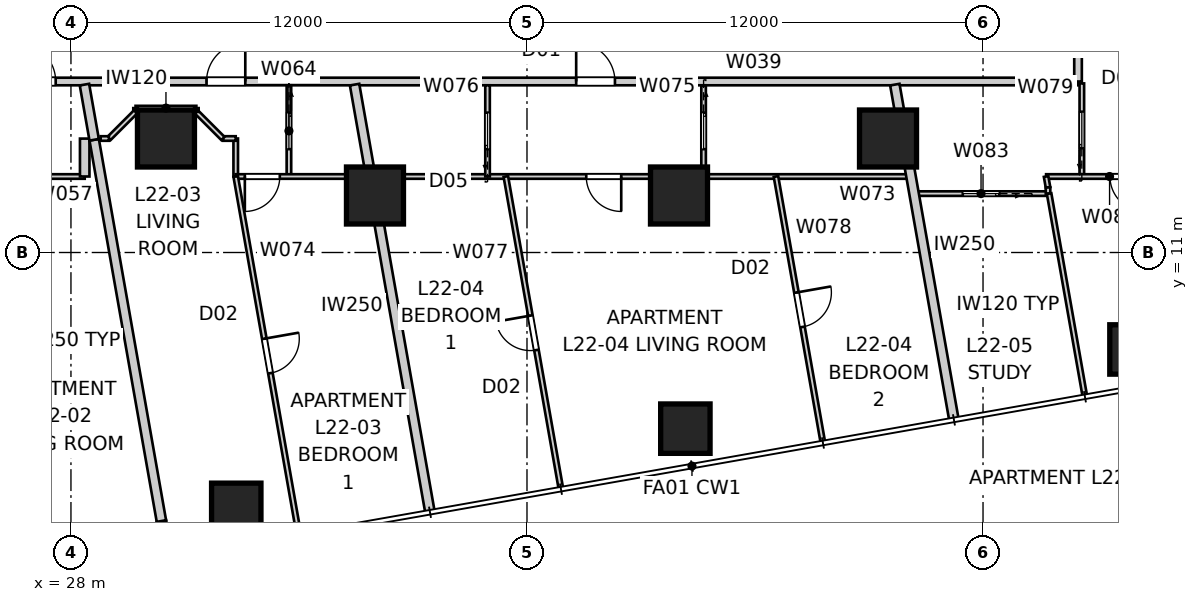
"""IFC4 building model, lengths in metres.
Left out: names, types, materials, properties, quantities, classifications, styles, units other than length and angle.
Written with IfcOpenShell. Run it as: python <this file> out.ifc"""

import sys

from ifc_helpers import new_model, si_unit, direction, frame, frame_2d, origin, origin_2d, place, context, subcontext, project, spatial, rectangle, extrude, element, fill, save


model = new_model("IFC4")
c1 = context("Model", 3, precision=1e-05, world=origin(), true_north=direction((0.0, 1.0)))
c2 = subcontext(c1, "Body", "Model", "MODEL_VIEW")
j1 = project(units=[si_unit("LENGTHUNIT", "METRE"), si_unit("PLANEANGLEUNIT", "RADIAN")], contexts=[c1])
p1 = place(None, origin())
s1 = spatial("IfcSite", under=j1, at=p1, CompositionType="ELEMENT")
p2 = place(p1, origin())
s2 = spatial("IfcBuilding", under=s1, at=p2, CompositionType="ELEMENT")
p3 = place(p2, frame((0.0, 0.0, 82.8)))
s3 = spatial("IfcBuildingStorey", under=s2, at=p3, CompositionType="ELEMENT", Elevation=82.8)
for number, where, z_axis, x_axis in (
    (1, (32.35, 4.281, 0.0), (0.0, 0.0, 1.0), (1.0, 0.0, 0.0)),
    (2, (44.167, 6.365, 0.0), (0.0, 0.0, 1.0), (1.0, 0.0, 0.0)),
    (3, (55.985, 8.448, 0.0), (0.0, 0.0, 1.0), (1.0, 0.0, 0.0)),
):
    element("IfcColumn", number, at=place(p3, frame(where, z_axis=z_axis, x_axis=x_axis)), inside=s3, PredefinedType="COLUMN", context=c2, shape_type="SweptSolid", body=[
        extrude(rectangle(XDim=1.3, YDim=1.3, at=origin_2d()), origin(), (0.0, 0.0, 1.0), 3.4),
    ])
for number, where, z_axis, x_axis in (
    (4, (30.5, 14.0, 0.0), (0.0, 0.0, 1.0), (1.0, 0.0, 0.0)),
    (5, (36.0, 12.5, 0.0), (0.0, 0.0, 1.0), (1.0, 0.0, 0.0)),
    (6, (44.0, 12.5, 0.0), (0.0, 0.0, 1.0), (1.0, 0.0, 0.0)),
    (7, (49.5, 14.0, 0.0), (0.0, 0.0, 1.0), (1.0, 0.0, 0.0)),
):
    element("IfcColumn", number, at=place(p3, frame(where, z_axis=z_axis, x_axis=x_axis)), inside=s3, PredefinedType="COLUMN", context=c2, shape_type="SweptSolid", body=[
        extrude(rectangle(XDim=1.5, YDim=1.5, at=origin_2d()), origin(), (0.0, 0.0, 1.0), 3.4),
    ])
p4 = place(p3, frame((25.5, 15.5, 0.0), z_axis=(0.0, 0.0, 1.0), x_axis=(1.0, 0.0, 0.0)))
e8 = element("IfcWall", 8, at=p4, inside=s3, PredefinedType="PARTITIONING", context=c2, shape_type="SweptSolid", body=[
    extrude(rectangle(XDim=29.0, YDim=0.2, at=frame_2d((14.5, 0.0))), origin(), (0.0, 0.0, 1.0), 3.25),
])
p5 = place(p4, frame((15.794, 0.0, 0.0)))
e9 = element("IfcOpeningElement", 9, at=p5, cuts=e8, PredefinedType="OPENING", context=c2, shape_type="SweptSolid", body=[
    extrude(rectangle(XDim=1.02, YDim=2.34, at=frame_2d((0.51, 1.17))), frame((0.0, 0.11, 0.0), z_axis=(0.0, -1.0, 0.0), x_axis=(1.0, 0.0, 0.0)), (0.0, 0.0, 1.0), 0.22),
])
p6 = place(p4, frame((6.067, 0.0, 0.0)))
e10 = element("IfcOpeningElement", 10, at=p6, cuts=e8, PredefinedType="OPENING", context=c2, shape_type="SweptSolid", body=[
    extrude(rectangle(XDim=1.02, YDim=2.34, at=frame_2d((0.51, 1.17))), frame((0.0, 0.11, 0.0), z_axis=(0.0, -1.0, 0.0), x_axis=(1.0, 0.0, 0.0)), (0.0, 0.0, 1.0), 0.22),
])
p7 = place(p4, frame((1.079, 0.0, 0.0)))
e11 = element("IfcOpeningElement", 11, at=p7, cuts=e8, PredefinedType="OPENING", context=c2, shape_type="SweptSolid", body=[
    extrude(rectangle(XDim=1.02, YDim=2.34, at=frame_2d((0.51, 1.17))), frame((0.0, 0.11, 0.0), z_axis=(0.0, -1.0, 0.0), x_axis=(1.0, 0.0, 0.0)), (0.0, 0.0, 1.0), 0.22),
])
p8 = place(p3, frame((54.5, 15.5, 0.0), z_axis=(0.0, 0.0, 1.0), x_axis=(0.0, 1.0, 0.0)))
e12 = element("IfcWall", 12, at=p8, inside=s3, PredefinedType="PARTITIONING", context=c2, shape_type="SweptSolid", body=[
    extrude(rectangle(XDim=29.0, YDim=0.2, at=frame_2d((14.5, 0.0))), origin(), (0.0, 0.0, 1.0), 3.25),
])
p9 = place(p8, frame((21.815, 0.0, 0.0)))
e13 = element("IfcOpeningElement", 13, at=p9, cuts=e12, PredefinedType="OPENING", context=c2, shape_type="SweptSolid", body=[
    extrude(rectangle(XDim=1.02, YDim=2.34, at=frame_2d((0.51, 1.17))), frame((0.0, 0.11, 0.0), z_axis=(0.0, -1.0, 0.0), x_axis=(1.0, 0.0, 0.0)), (0.0, 0.0, 1.0), 0.22),
])
p10 = place(p8, frame((2.855, 0.0, 0.0)))
e14 = element("IfcOpeningElement", 14, at=p10, cuts=e12, PredefinedType="OPENING", context=c2, shape_type="SweptSolid", body=[
    extrude(rectangle(XDim=1.02, YDim=2.1, at=frame_2d((0.51, 1.05))), frame((0.0, 0.11, 0.0), z_axis=(0.0, -1.0, 0.0), x_axis=(1.0, 0.0, 0.0)), (0.0, 0.0, 1.0), 0.22),
])
p11 = place(p3, frame((37.448, 4.164, 0.0), z_axis=(0.0, 0.0, 1.0), x_axis=(-0.173635416642, 0.98481000304, 0.0)))
e15 = element("IfcWall", 15, at=p11, inside=s3, PredefinedType="PARTITIONING", context=c2, shape_type="SweptSolid", body=[
    extrude(rectangle(XDim=11.427, YDim=0.25, at=frame_2d((5.713, 0.0))), origin(), (0.0, 0.0, 1.0), 3.25),
])
p12 = place(p3, frame((51.235, 6.595, 0.0), z_axis=(0.0, 0.0, 1.0), x_axis=(-0.173654738504, 0.984806596137, 0.0)))
e16 = element("IfcWall", 16, at=p12, inside=s3, PredefinedType="PARTITIONING", context=c2, shape_type="SweptSolid", body=[
    extrude(rectangle(XDim=8.958, YDim=0.25, at=frame_2d((4.479, 0.0))), origin(), (0.0, 0.0, 1.0), 3.25),
])
p13 = place(p3, frame((30.554, 2.949, 0.0), z_axis=(0.0, 0.0, 1.0), x_axis=(-0.173813186416, 0.984778643263, 0.0)))
e17 = element("IfcWall", 17, at=p13, inside=s3, PredefinedType="PARTITIONING", context=c2, shape_type="SweptSolid", body=[
    extrude(rectangle(XDim=1.0, YDim=0.25, at=frame_2d((0.5, 0.0))), origin(), (0.0, 0.0, 1.0), 3.25),
])
p14 = place(p3, frame((30.38, 3.934, 0.0), z_axis=(0.0, 0.0, 1.0), x_axis=(-0.173644522411, 0.984808397525, 0.0)))
e18 = element("IfcWall", 18, at=p14, inside=s3, PredefinedType="PARTITIONING", context=c2, shape_type="SweptSolid", body=[
    extrude(rectangle(XDim=10.188, YDim=0.25, at=frame_2d((5.094, 0.0))), origin(), (0.0, 0.0, 1.0), 2.638),
])
p15 = place(p3, frame((28.611, 13.967, 0.0), z_axis=(0.0, 0.0, 1.0), x_axis=(-0.173634105885, 0.984810234143, 0.0)))
e19 = element("IfcWall", 19, at=p15, inside=s3, PredefinedType="PARTITIONING", context=c2, shape_type="SweptSolid", body=[
    extrude(rectangle(XDim=1.474, YDim=0.25, at=frame_2d((0.737, 0.0))), origin(), (0.0, 0.0, 1.0), 3.25),
])
p16 = place(p3, frame((28.362, 13.0, 0.0), z_axis=(0.0, 0.0, 1.0), x_axis=(-1.0, 0.0, 0.0)))
e20 = element("IfcWall", 20, at=p16, inside=s3, PredefinedType="PARTITIONING", context=c2, shape_type="SweptSolid", body=[
    extrude(rectangle(XDim=4.151, YDim=0.12, at=frame_2d((2.076, 0.0))), origin(), (0.0, 0.0, 1.0), 2.638),
])
p17 = place(p16, frame((1.76, 0.0, 0.0)))
e21 = element("IfcOpeningElement", 21, at=p17, cuts=e20, PredefinedType="OPENING", context=c2, shape_type="SweptSolid", body=[
    extrude(rectangle(XDim=0.92, YDim=2.34, at=frame_2d((0.46, 1.17))), frame((0.0, 0.07, 0.0), z_axis=(0.0, -1.0, 0.0), x_axis=(1.0, 0.0, 0.0)), (0.0, 0.0, 1.0), 0.14),
])
p18 = place(p3, frame((28.362, 13.998, 0.0), z_axis=(0.0, 0.0, 1.0), x_axis=(0.0, -1.0, 0.0)))
e22 = element("IfcWall", 22, at=p18, inside=s3, PredefinedType="PARTITIONING", context=c2, shape_type="SweptSolid", body=[
    extrude(rectangle(XDim=0.998, YDim=0.25, at=frame_2d((0.499, 0.0))), origin(), (0.0, 0.0, 1.0), 3.25),
])
p19 = place(p3, frame((33.736, 15.4, 0.0), z_axis=(0.0, 0.0, 1.0), x_axis=(0.0, -1.0, 0.0)))
e23 = element("IfcWall", 23, at=p19, inside=s3, PredefinedType="PARTITIONING", context=c2, shape_type="SweptSolid", body=[
    extrude(rectangle(XDim=2.4, YDim=0.12, at=frame_2d((1.2, 0.0))), origin(), (0.0, 0.0, 1.0), 3.25),
])
p20 = place(p19, frame((0.72, 0.0, 0.0)))
e24 = element("IfcOpeningElement", 24, at=p20, cuts=e23, PredefinedType="OPENING", context=c2, shape_type="SweptSolid", body=[
    extrude(rectangle(XDim=0.96, YDim=2.1, at=frame_2d((0.48, 1.05))), frame((0.0, 0.07, 0.0), z_axis=(0.0, -1.0, 0.0), x_axis=(1.0, 0.0, 0.0)), (0.0, 0.0, 1.0), 0.14),
])
p21 = place(p3, frame((32.336, 13.0, 0.0), z_axis=(0.0, 0.0, 1.0), x_axis=(0.0, 1.0, 0.0)))
e25 = element("IfcWall", 25, at=p21, inside=s3, PredefinedType="PARTITIONING", context=c2, shape_type="SweptSolid", body=[
    extrude(rectangle(XDim=1.0, YDim=0.12, at=frame_2d((0.5, 0.0))), origin(), (0.0, 0.0, 1.0), 3.25),
])
p22 = place(p3, frame((32.336, 14.0, 0.0), z_axis=(0.0, 0.0, 1.0), x_axis=(-1.0, 0.0, 0.0)))
e26 = element("IfcWall", 26, at=p22, inside=s3, PredefinedType="PARTITIONING", context=c2, shape_type="SweptSolid", body=[
    extrude(rectangle(XDim=0.336, YDim=0.12, at=frame_2d((0.168, 0.0))), origin(), (0.0, 0.0, 1.0), 3.25),
])
p23 = place(p3, frame((32.0, 14.0, 0.0), z_axis=(0.0, 0.0, 1.0), x_axis=(-0.707106781187, 0.707106781187, 0.0)))
e27 = element("IfcWall", 27, at=p23, inside=s3, PredefinedType="PARTITIONING", context=c2, shape_type="SweptSolid", body=[
    extrude(rectangle(XDim=0.99, YDim=0.12, at=frame_2d((0.495, 0.0))), origin(), (0.0, 0.0, 1.0), 3.25),
])
p24 = place(p3, frame((31.3, 14.8, 0.0), z_axis=(0.0, 0.0, 1.0), x_axis=(-1.0, 0.0, 0.0)))
e28 = element("IfcWall", 28, at=p24, inside=s3, PredefinedType="PARTITIONING", context=c2, shape_type="SweptSolid", body=[
    extrude(rectangle(XDim=1.6, YDim=0.12, at=frame_2d((0.8, 0.0))), origin(), (0.0, 0.0, 1.0), 3.25),
])
p25 = place(p3, frame((29.7, 14.7, 0.0), z_axis=(0.0, 0.0, 1.0), x_axis=(-0.707106781187, -0.707106781187, 0.0)))
e29 = element("IfcWall", 29, at=p25, inside=s3, PredefinedType="PARTITIONING", context=c2, shape_type="SweptSolid", body=[
    extrude(rectangle(XDim=0.99, YDim=0.12, at=frame_2d((0.495, 0.0))), origin(), (0.0, 0.0, 1.0), 3.25),
])
p26 = place(p3, frame((29.0, 14.0, 0.0), z_axis=(0.0, 0.0, 1.0), x_axis=(-1.0, 0.0, 0.0)))
e30 = element("IfcWall", 30, at=p26, inside=s3, PredefinedType="PARTITIONING", context=c2, shape_type="SweptSolid", body=[
    extrude(rectangle(XDim=0.219, YDim=0.12, at=frame_2d((0.109, 0.0))), origin(), (0.0, 0.0, 1.0), 3.25),
])
p27 = place(p3, frame((50.105, 13.0, 0.0), z_axis=(0.0, 0.0, 1.0), x_axis=(-1.0, 0.0, 0.0)))
e31 = element("IfcWall", 31, at=p27, inside=s3, PredefinedType="PARTITIONING", context=c2, shape_type="SweptSolid", body=[
    extrude(rectangle(XDim=17.77, YDim=0.12, at=frame_2d((8.885, 0.0))), origin(), (0.0, 0.0, 1.0), 2.55),
])
p28 = place(p27, frame((7.626, 0.0, 0.0)))
e32 = element("IfcOpeningElement", 32, at=p28, cuts=e31, PredefinedType="OPENING", context=c2, shape_type="SweptSolid", body=[
    extrude(rectangle(XDim=0.92, YDim=2.34, at=frame_2d((0.46, 1.17))), frame((0.0, 0.07, 0.0), z_axis=(0.0, -1.0, 0.0), x_axis=(1.0, 0.0, 0.0)), (0.0, 0.0, 1.0), 0.14),
])
p29 = place(p27, frame((16.61, 0.0, 0.0)))
e33 = element("IfcOpeningElement", 33, at=p29, cuts=e31, PredefinedType="OPENING", context=c2, shape_type="SweptSolid", body=[
    extrude(rectangle(XDim=0.92, YDim=2.34, at=frame_2d((0.46, 1.17))), frame((0.0, 0.07, 0.0), z_axis=(0.0, -1.0, 0.0), x_axis=(1.0, 0.0, 0.0)), (0.0, 0.0, 1.0), 0.14),
])
p30 = place(p3, frame((32.336, 13.0, 0.0), z_axis=(0.0, 0.0, 1.0), x_axis=(0.173624894944, -0.984811858101, 0.0)))
e34 = element("IfcWall", 34, at=p30, inside=s3, PredefinedType="PARTITIONING", context=c2, shape_type="SweptSolid", body=[
    extrude(rectangle(XDim=9.549, YDim=0.12, at=frame_2d((4.774, 0.0))), origin(), (0.0, 0.0, 1.0), 3.25),
])
p31 = place(p30, frame((4.334, 0.0, 0.0)))
e35 = element("IfcOpeningElement", 35, at=p31, cuts=e34, PredefinedType="OPENING", context=c2, shape_type="SweptSolid", body=[
    extrude(rectangle(XDim=0.92, YDim=2.34, at=frame_2d((0.46, 1.17))), frame((0.0, 0.07, 0.0), z_axis=(0.0, -1.0, 0.0), x_axis=(1.0, 0.0, 0.0)), (0.0, 0.0, 1.0), 0.14),
])
p32 = place(p3, frame((44.647, 15.4, 0.0), z_axis=(0.0, 0.0, 1.0), x_axis=(0.0, -1.0, 0.0)))
e36 = element("IfcWall", 36, at=p32, inside=s3, PredefinedType="PARTITIONING", context=c2, shape_type="SweptSolid", body=[
    extrude(rectangle(XDim=2.4, YDim=0.12, at=frame_2d((1.2, 0.0))), origin(), (0.0, 0.0, 1.0), 3.25),
])
p33 = place(p32, frame((0.72, 0.0, 0.0)))
e37 = element("IfcOpeningElement", 37, at=p33, cuts=e36, PredefinedType="OPENING", context=c2, shape_type="SweptSolid", body=[
    extrude(rectangle(XDim=0.96, YDim=2.1, at=frame_2d((0.48, 1.05))), frame((0.0, 0.07, 0.0), z_axis=(0.0, -1.0, 0.0), x_axis=(1.0, 0.0, 0.0)), (0.0, 0.0, 1.0), 0.14),
])
p34 = place(p3, frame((38.962, 13.0, 0.0), z_axis=(0.0, 0.0, 1.0), x_axis=(0.0, 1.0, 0.0)))
e38 = element("IfcWall", 38, at=p34, inside=s3, PredefinedType="PARTITIONING", context=c2, shape_type="SweptSolid", body=[
    extrude(rectangle(XDim=2.4, YDim=0.12, at=frame_2d((1.2, 0.0))), origin(), (0.0, 0.0, 1.0), 3.25),
])
p35 = place(p34, frame((0.72, 0.0, 0.0)))
e39 = element("IfcOpeningElement", 39, at=p35, cuts=e38, PredefinedType="OPENING", context=c2, shape_type="SweptSolid", body=[
    extrude(rectangle(XDim=0.96, YDim=2.1, at=frame_2d((0.48, 1.05))), frame((0.0, 0.07, 0.0), z_axis=(0.0, -1.0, 0.0), x_axis=(1.0, 0.0, 0.0)), (0.0, 0.0, 1.0), 0.14),
])
p36 = place(p3, frame((40.887, 4.812, 0.0), z_axis=(0.0, 0.0, 1.0), x_axis=(-0.173647980238, 0.984807787824, 0.0)))
e40 = element("IfcWall", 40, at=p36, inside=s3, PredefinedType="PARTITIONING", context=c2, shape_type="SweptSolid", body=[
    extrude(rectangle(XDim=8.315, YDim=0.12, at=frame_2d((4.157, 0.0))), origin(), (0.0, 0.0, 1.0), 3.25),
])
p37 = place(p36, frame((3.677, 0.0, 0.0)))
e41 = element("IfcOpeningElement", 41, at=p37, cuts=e40, PredefinedType="OPENING", context=c2, shape_type="SweptSolid", body=[
    extrude(rectangle(XDim=0.92, YDim=2.34, at=frame_2d((0.46, 1.17))), frame((0.0, 0.07, 0.0), z_axis=(0.0, -1.0, 0.0), x_axis=(1.0, 0.0, 0.0)), (0.0, 0.0, 1.0), 0.14),
])
p38 = place(p3, frame((46.552, 13.0, 0.0), z_axis=(0.0, 0.0, 1.0), x_axis=(0.173639776761, -0.984809234282, 0.0)))
e42 = element("IfcWall", 42, at=p38, inside=s3, PredefinedType="PARTITIONING", context=c2, shape_type="SweptSolid", body=[
    extrude(rectangle(XDim=7.081, YDim=0.12, at=frame_2d((3.541, 0.0))), origin(), (0.0, 0.0, 1.0), 3.25),
])
p39 = place(p38, frame((3.1, 0.0, 0.0)))
e43 = element("IfcOpeningElement", 43, at=p39, cuts=e42, PredefinedType="OPENING", context=c2, shape_type="SweptSolid", body=[
    extrude(rectangle(XDim=0.92, YDim=2.34, at=frame_2d((0.46, 1.17))), frame((0.0, 0.07, 0.0), z_axis=(0.0, -1.0, 0.0), x_axis=(1.0, 0.0, 0.0)), (0.0, 0.0, 1.0), 0.14),
])
p40 = place(p3, frame((54.6, 13.0, 0.0), z_axis=(0.0, 0.0, 1.0), x_axis=(0.0, 1.0, 0.0)))
e44 = element("IfcWall", 44, at=p40, inside=s3, PredefinedType="PARTITIONING", context=c2, shape_type="SweptSolid", body=[
    extrude(rectangle(XDim=2.45, YDim=0.12, at=frame_2d((1.225, 0.0))), origin(), (0.0, 0.0, 1.0), 3.25),
])
p41 = place(p40, frame((0.745, 0.0, 0.0)))
e45 = element("IfcOpeningElement", 45, at=p41, cuts=e44, PredefinedType="OPENING", context=c2, shape_type="SweptSolid", body=[
    extrude(rectangle(XDim=0.96, YDim=2.1, at=frame_2d((0.48, 1.05))), frame((0.0, 0.07, 0.0), z_axis=(0.0, -1.0, 0.0), x_axis=(1.0, 0.0, 0.0)), (0.0, 0.0, 1.0), 0.14),
])
p42 = place(p3, frame((57.0, 13.0, 0.0), z_axis=(0.0, 0.0, 1.0), x_axis=(-1.0, 0.0, 0.0)))
e46 = element("IfcWall", 46, at=p42, inside=s3, PredefinedType="PARTITIONING", context=c2, shape_type="SweptSolid", body=[
    extrude(rectangle(XDim=3.34, YDim=0.12, at=frame_2d((1.67, 0.0))), origin(), (0.0, 0.0, 1.0), 3.25),
])
p43 = place(p42, frame((0.74, 0.0, 0.0)))
e47 = element("IfcOpeningElement", 47, at=p43, cuts=e46, PredefinedType="OPENING", context=c2, shape_type="SweptSolid", body=[
    extrude(rectangle(XDim=0.92, YDim=2.34, at=frame_2d((0.46, 1.17))), frame((0.0, 0.07, 0.0), z_axis=(0.0, -1.0, 0.0), x_axis=(1.0, 0.0, 0.0)), (0.0, 0.0, 1.0), 0.14),
])
p44 = place(p3, frame((53.71, 12.55, 0.0), z_axis=(0.0, 0.0, 1.0), x_axis=(-1.0, 0.0, 0.0)))
e48 = element("IfcWall", 48, at=p44, inside=s3, PredefinedType="PARTITIONING", context=c2, shape_type="SweptSolid", body=[
    extrude(rectangle(XDim=3.525, YDim=0.12, at=frame_2d((1.763, 0.0))), origin(), (0.0, 0.0, 1.0), 3.25),
])
p45 = place(p44, frame((1.283, 0.0, 0.0)))
e49 = element("IfcOpeningElement", 49, at=p45, cuts=e48, PredefinedType="OPENING", context=c2, shape_type="SweptSolid", body=[
    extrude(rectangle(XDim=0.96, YDim=2.1, at=frame_2d((0.48, 1.05))), frame((0.0, 0.07, 0.0), z_axis=(0.0, -1.0, 0.0), x_axis=(1.0, 0.0, 0.0)), (0.0, 0.0, 1.0), 0.14),
])
p46 = place(p3, frame((53.66, 13.0, 0.0), z_axis=(0.0, 0.0, 1.0), x_axis=(0.172927442902, -0.984934566096, 0.0)))
e50 = element("IfcWall", 50, at=p46, inside=s3, PredefinedType="PARTITIONING", context=c2, shape_type="SweptSolid", body=[
    extrude(rectangle(XDim=0.292, YDim=0.12, at=frame_2d((0.146, 0.0))), origin(), (0.0, 0.0, 1.0), 3.25),
])
p47 = place(p3, frame((53.739, 12.55, 0.0), z_axis=(0.0, 0.0, 1.0), x_axis=(0.173632864151, -0.984810453076, 0.0)))
e51 = element("IfcWall", 51, at=p47, inside=s3, PredefinedType="PARTITIONING", context=c2, shape_type="SweptSolid", body=[
    extrude(rectangle(XDim=5.389, YDim=0.12, at=frame_2d((2.695, 0.0))), origin(), (0.0, 0.0, 1.0), 3.25),
])
for number, where, z_axis, x_axis in (
    (52, (31.3, 14.8, 0.0), (0.0, 0.0, 1.0), (0.0, -1.0, 0.0)),
    (53, (29.7, 14.8, 0.0), (0.0, 0.0, 1.0), (0.0, -1.0, 0.0)),
):
    element("IfcWall", number, at=place(p3, frame(where, z_axis=z_axis, x_axis=x_axis)), inside=s3, PredefinedType="PARTITIONING", context=c2, shape_type="SweptSolid", body=[
        extrude(rectangle(XDim=0.1, YDim=0.12, at=frame_2d((0.05, 0.0))), origin(), (0.0, 0.0, 1.0), 3.25),
    ])
p48 = place(p3, frame((53.71, 12.712, 0.0), z_axis=(0.0, 0.0, 1.0), x_axis=(0.0, -1.0, 0.0)))
e54 = element("IfcWall", 54, at=p48, inside=s3, PredefinedType="PARTITIONING", context=c2, shape_type="SweptSolid", body=[
    extrude(rectangle(XDim=0.162, YDim=0.12, at=frame_2d((0.081, 0.0))), origin(), (0.0, 0.0, 1.0), 3.25),
])
p49 = place(p5, origin())
e55 = element("IfcDoor", 55, at=p49, inside=s3, OperationType="SINGLE_SWING_LEFT", PredefinedType="DOOR", context=c2, shape_type="SweptSolid", body=[
    extrude(rectangle(XDim=1.02, YDim=2.34, at=frame_2d((0.51, 1.17))), frame((0.0, 0.025, 0.0), z_axis=(0.0, -1.0, 0.0), x_axis=(1.0, 0.0, 0.0)), (0.0, 0.0, 1.0), 0.05),
])
fill(e9, e55)
p50 = place(p6, origin())
e56 = element("IfcDoor", 56, at=p50, inside=s3, OperationType="SINGLE_SWING_RIGHT", PredefinedType="DOOR", context=c2, shape_type="SweptSolid", body=[
    extrude(rectangle(XDim=1.02, YDim=2.34, at=frame_2d((0.51, 1.17))), frame((0.0, 0.025, 0.0), z_axis=(0.0, -1.0, 0.0), x_axis=(1.0, 0.0, 0.0)), (0.0, 0.0, 1.0), 0.05),
])
fill(e10, e56)
p51 = place(p7, origin())
e57 = element("IfcDoor", 57, at=p51, inside=s3, OperationType="SINGLE_SWING_LEFT", PredefinedType="DOOR", context=c2, shape_type="SweptSolid", body=[
    extrude(rectangle(XDim=1.02, YDim=2.34, at=frame_2d((0.51, 1.17))), frame((0.0, 0.025, 0.0), z_axis=(0.0, -1.0, 0.0), x_axis=(1.0, 0.0, 0.0)), (0.0, 0.0, 1.0), 0.05),
])
fill(e11, e57)
p52 = place(p41, origin())
e58 = element("IfcDoor", 58, at=p52, inside=s3, OperationType="SLIDING_TO_LEFT", PredefinedType="DOOR", context=c2, shape_type="SweptSolid", body=[
    extrude(rectangle(XDim=0.96, YDim=2.1, at=frame_2d((0.48, 1.05))), frame((0.0, 0.025, 0.0), z_axis=(0.0, -1.0, 0.0), x_axis=(1.0, 0.0, 0.0)), (0.0, 0.0, 1.0), 0.05),
])
fill(e45, e58)
p53 = place(p43, origin())
e59 = element("IfcDoor", 59, at=p53, inside=s3, OperationType="SINGLE_SWING_LEFT", PredefinedType="DOOR", context=c2, shape_type="SweptSolid", body=[
    extrude(rectangle(XDim=0.92, YDim=2.34, at=frame_2d((0.46, 1.17))), frame((0.0, 0.025, 0.0), z_axis=(0.0, -1.0, 0.0), x_axis=(1.0, 0.0, 0.0)), (0.0, 0.0, 1.0), 0.05),
])
fill(e47, e59)
p54 = place(p28, origin())
e60 = element("IfcDoor", 60, at=p54, inside=s3, OperationType="SINGLE_SWING_LEFT", PredefinedType="DOOR", context=c2, shape_type="SweptSolid", body=[
    extrude(rectangle(XDim=0.92, YDim=2.34, at=frame_2d((0.46, 1.17))), frame((0.0, 0.025, 0.0), z_axis=(0.0, -1.0, 0.0), x_axis=(1.0, 0.0, 0.0)), (0.0, 0.0, 1.0), 0.05),
])
fill(e32, e60)
p55 = place(p33, origin())
e61 = element("IfcDoor", 61, at=p55, inside=s3, OperationType="SLIDING_TO_LEFT", PredefinedType="DOOR", context=c2, shape_type="SweptSolid", body=[
    extrude(rectangle(XDim=0.96, YDim=2.1, at=frame_2d((0.48, 1.05))), frame((0.0, 0.025, 0.0), z_axis=(0.0, -1.0, 0.0), x_axis=(1.0, 0.0, 0.0)), (0.0, 0.0, 1.0), 0.05),
])
fill(e37, e61)
p56 = place(p35, origin())
e62 = element("IfcDoor", 62, at=p56, inside=s3, OperationType="SLIDING_TO_LEFT", PredefinedType="DOOR", context=c2, shape_type="SweptSolid", body=[
    extrude(rectangle(XDim=0.96, YDim=2.1, at=frame_2d((0.48, 1.05))), frame((0.0, 0.025, 0.0), z_axis=(0.0, -1.0, 0.0), x_axis=(1.0, 0.0, 0.0)), (0.0, 0.0, 1.0), 0.05),
])
fill(e39, e62)
p57 = place(p20, origin())
e63 = element("IfcDoor", 63, at=p57, inside=s3, OperationType="SLIDING_TO_LEFT", PredefinedType="DOOR", context=c2, shape_type="SweptSolid", body=[
    extrude(rectangle(XDim=0.96, YDim=2.1, at=frame_2d((0.48, 1.05))), frame((0.0, 0.025, 0.0), z_axis=(0.0, -1.0, 0.0), x_axis=(1.0, 0.0, 0.0)), (0.0, 0.0, 1.0), 0.05),
])
fill(e24, e63)
p58 = place(p29, origin())
e64 = element("IfcDoor", 64, at=p58, inside=s3, OperationType="SINGLE_SWING_RIGHT", PredefinedType="DOOR", context=c2, shape_type="SweptSolid", body=[
    extrude(rectangle(XDim=0.92, YDim=2.34, at=frame_2d((0.46, 1.17))), frame((0.0, 0.025, 0.0), z_axis=(0.0, -1.0, 0.0), x_axis=(1.0, 0.0, 0.0)), (0.0, 0.0, 1.0), 0.05),
])
fill(e33, e64)
p59 = place(p45, origin())
e65 = element("IfcDoor", 65, at=p59, inside=s3, OperationType="SLIDING_TO_LEFT", PredefinedType="DOOR", context=c2, shape_type="SweptSolid", body=[
    extrude(rectangle(XDim=0.96, YDim=2.1, at=frame_2d((0.48, 1.05))), frame((0.0, 0.025, 0.0), z_axis=(0.0, -1.0, 0.0), x_axis=(1.0, 0.0, 0.0)), (0.0, 0.0, 1.0), 0.05),
])
fill(e49, e65)
p60 = place(p37, origin())
e66 = element("IfcDoor", 66, at=p60, inside=s3, OperationType="SINGLE_SWING_RIGHT", PredefinedType="DOOR", context=c2, shape_type="SweptSolid", body=[
    extrude(rectangle(XDim=0.92, YDim=2.34, at=frame_2d((0.46, 1.17))), frame((0.0, 0.025, 0.0), z_axis=(0.0, -1.0, 0.0), x_axis=(1.0, 0.0, 0.0)), (0.0, 0.0, 1.0), 0.05),
])
fill(e41, e66)
p61 = place(p39, origin())
e67 = element("IfcDoor", 67, at=p61, inside=s3, OperationType="SINGLE_SWING_LEFT", PredefinedType="DOOR", context=c2, shape_type="SweptSolid", body=[
    extrude(rectangle(XDim=0.92, YDim=2.34, at=frame_2d((0.46, 1.17))), frame((0.0, 0.025, 0.0), z_axis=(0.0, -1.0, 0.0), x_axis=(1.0, 0.0, 0.0)), (0.0, 0.0, 1.0), 0.05),
])
fill(e43, e67)
p62 = place(p31, origin())
e68 = element("IfcDoor", 68, at=p62, inside=s3, OperationType="SINGLE_SWING_LEFT", PredefinedType="DOOR", context=c2, shape_type="SweptSolid", body=[
    extrude(rectangle(XDim=0.92, YDim=2.34, at=frame_2d((0.46, 1.17))), frame((0.0, 0.025, 0.0), z_axis=(0.0, -1.0, 0.0), x_axis=(1.0, 0.0, 0.0)), (0.0, 0.0, 1.0), 0.05),
])
fill(e35, e68)
save(model, sys.argv[1])
